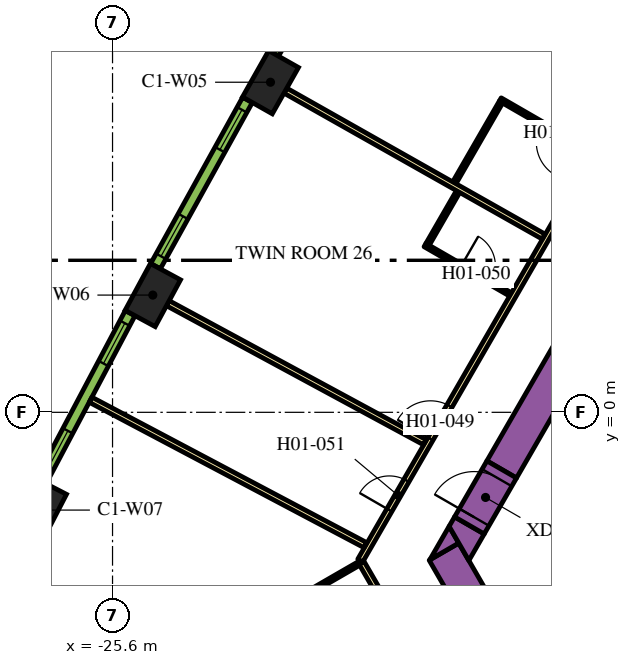
"""IFC4 building model, lengths in metres.
Left out: names, types, materials, properties, quantities, classifications, styles, units other than length and angle.
Written with IfcOpenShell. Run it as: python <this file> out.ifc"""

import sys

from ifc_helpers import new_model, si_unit, direction, frame, frame_2d, origin, origin_2d, place, context, subcontext, project, spatial, polyline, rectangle, outline, extrude, element, fill, save


model = new_model("IFC4")
c1 = context("Model", 3, precision=1e-05, world=origin(), true_north=direction((0.0, 1.0)))
c2 = subcontext(c1, "Body", "Model", "MODEL_VIEW")
j1 = project(units=[si_unit("LENGTHUNIT", "METRE"), si_unit("PLANEANGLEUNIT", "RADIAN")], contexts=[c1])
p1 = place(None, origin())
s1 = spatial("IfcSite", under=j1, at=p1, CompositionType="ELEMENT")
p2 = place(p1, origin())
s2 = spatial("IfcBuilding", under=s1, at=p2, CompositionType="ELEMENT")
p3 = place(p2, frame((0.0, 0.0, 27.6)))
s3 = spatial("IfcBuildingStorey", under=s2, at=p3, CompositionType="ELEMENT", Elevation=27.6)
for number, where, z_axis, x_axis in (
    (1, (-21.443, 8.685, 0.0), (0.0, 0.0, 1.0), (-0.492, -0.871, 0.0)),
    (2, (-24.54, 3.085, 0.0), (0.0, 0.0, 1.0), (-0.476, -0.88, 0.0)),
    (3, (-27.533, -2.572, 0.0), (0.0, 0.0, 1.0), (-0.459, -0.888, 0.0)),
):
    element("IfcColumn", number, at=place(p3, frame(where, z_axis=z_axis, x_axis=x_axis)), inside=s3, PredefinedType="COLUMN", context=c2, shape_type="SweptSolid", body=[
        extrude(rectangle(XDim=1.4, YDim=0.9, at=origin_2d()), origin(), (0.0, 0.0, 1.0), 3.9),
    ])
p4 = place(p3, frame((-15.36, -1.503, 0.0), z_axis=(0.0, 0.0, 1.0), x_axis=(0.50000389221, 0.866023156604, 0.0)))
e4 = element("IfcWall", 4, at=p4, inside=s3, PredefinedType="SOLIDWALL", context=c2, shape_type="SweptSolid", body=[
    extrude(rectangle(XDim=21.0, YDim=0.9, at=frame_2d((10.5, 0.0))), origin(), (0.0, 0.0, 1.0), 3.9),
])
p5 = place(p3, frame((-12.134, -11.883, 0.0), z_axis=(0.0, 0.0, 1.0), x_axis=(-0.500005339912, 0.866022320763, 0.0)))
e5 = element("IfcWall", 5, at=p5, inside=s3, PredefinedType="SOLIDWALL", context=c2, shape_type="SweptSolid", body=[
    extrude(rectangle(XDim=9.488, YDim=0.9, at=frame_2d((4.744, 0.0))), origin(), (0.0, 0.0, 1.0), 3.9),
])
p6 = place(p3, origin())
e6 = element("IfcWall", 6, at=p6, inside=s3, PredefinedType="SOLIDWALL", context=c2, shape_type="SweptSolid", body=[
    extrude(outline(polyline([(-16.489, -3.44), (-17.251, -3.88), (-16.743, -3.0), (-16.489, -3.44)])), origin(), (0.0, 0.0, 1.0), 3.9),
])
e7 = element("IfcWall", 7, at=p6, inside=s3, PredefinedType="SOLIDWALL", context=c2, shape_type="SweptSolid", body=[
    extrude(outline(polyline([(-15.82, -3.201), (-16.223, -3.9), (-16.743, -3.0), (-16.599, -2.751), (-15.82, -3.201)])), origin(), (0.0, 0.0, 1.0), 3.9),
])
p7 = place(p3, frame((-14.44, -6.49, 0.0), z_axis=(0.0, 0.0, 1.0), x_axis=(0.866022966069, 0.500004222222, 0.0)))
e8 = element("IfcWall", 8, at=p7, inside=s3, PredefinedType="SOLIDWALL", context=c2, shape_type="SweptSolid", body=[
    extrude(rectangle(XDim=6.8, YDim=0.25, at=frame_2d((3.4, 0.0))), origin(), (0.0, 0.0, 1.0), 3.9),
])
p8 = place(p3, frame((-16.209, -2.976, 0.0), z_axis=(0.0, 0.0, 1.0), x_axis=(0.499954529098, 0.86605165483, 0.0)))
e9 = element("IfcWall", 9, at=p8, inside=s3, PredefinedType="SOLIDWALL", context=c2, shape_type="SweptSolid", body=[
    extrude(rectangle(XDim=1.7, YDim=0.9, at=frame_2d((0.85, 0.0))), origin(), (0.0, 0.0, 1.0), 3.9),
])
p9 = place(p8, frame((0.25, 0.0, 0.0)))
e10 = element("IfcOpeningElement", 10, at=p9, cuts=e9, PredefinedType="OPENING", context=c2, shape_type="SweptSolid", body=[
    extrude(rectangle(XDim=1.2, YDim=2.1, at=frame_2d((0.6, 1.05))), frame((0.0, 0.46, 0.0), z_axis=(0.0, -1.0, 0.0), x_axis=(1.0, 0.0, 0.0)), (0.0, 0.0, 1.0), 0.92),
])
p10 = place(p3, frame((-19.081, -3.9, 0.0), z_axis=(0.0, 0.0, 1.0), x_axis=(0.499998313975, 0.866026377209, 0.0)))
e11 = element("IfcWall", 11, at=p10, inside=s3, PredefinedType="PARTITIONING", context=c2, shape_type="SweptSolid", body=[
    extrude(rectangle(XDim=25.766, YDim=0.15, at=frame_2d((12.883, 0.0))), origin(), (0.0, 0.0, 1.0), 2.75),
])
p11 = place(p10, frame((24.586, 0.0, 0.0)))
e12 = element("IfcOpeningElement", 12, at=p11, cuts=e11, PredefinedType="OPENING", context=c2, shape_type="SweptSolid", body=[
    extrude(rectangle(XDim=1.0, YDim=2.1, at=frame_2d((0.5, 1.05))), frame((0.0, 0.085, 0.0), z_axis=(0.0, -1.0, 0.0), x_axis=(1.0, 0.0, 0.0)), (0.0, 0.0, 1.0), 0.17),
])
p12 = place(p10, frame((16.196, 0.0, 0.0)))
e13 = element("IfcOpeningElement", 13, at=p12, cuts=e11, PredefinedType="OPENING", context=c2, shape_type="SweptSolid", body=[
    extrude(rectangle(XDim=1.0, YDim=2.1, at=frame_2d((0.5, 1.05))), frame((0.0, 0.085, 0.0), z_axis=(0.0, -1.0, 0.0), x_axis=(1.0, 0.0, 0.0)), (0.0, 0.0, 1.0), 0.17),
])
p13 = place(p10, frame((14.789, 0.0, 0.0)))
e14 = element("IfcOpeningElement", 14, at=p13, cuts=e11, PredefinedType="OPENING", context=c2, shape_type="SweptSolid", body=[
    extrude(rectangle(XDim=1.1, YDim=2.1, at=frame_2d((0.55, 1.05))), frame((0.0, 0.085, 0.0), z_axis=(0.0, -1.0, 0.0), x_axis=(1.0, 0.0, 0.0)), (0.0, 0.0, 1.0), 0.17),
])
p14 = place(p10, frame((3.698, 0.0, 0.0)))
e15 = element("IfcOpeningElement", 15, at=p14, cuts=e11, PredefinedType="OPENING", context=c2, shape_type="SweptSolid", body=[
    extrude(rectangle(XDim=1.0, YDim=2.1, at=frame_2d((0.5, 1.05))), frame((0.0, 0.085, 0.0), z_axis=(0.0, -1.0, 0.0), x_axis=(1.0, 0.0, 0.0)), (0.0, 0.0, 1.0), 0.17),
])
p15 = place(p10, frame((1.531, 0.0, 0.0)))
e16 = element("IfcOpeningElement", 16, at=p15, cuts=e11, PredefinedType="OPENING", context=c2, shape_type="SweptSolid", body=[
    extrude(rectangle(XDim=0.9, YDim=2.1, at=frame_2d((0.45, 1.05))), frame((0.0, 0.085, 0.0), z_axis=(0.0, -1.0, 0.0), x_axis=(1.0, 0.0, 0.0)), (0.0, 0.0, 1.0), 0.17),
])
p16 = place(p3, frame((-16.412, -8.523, 0.0), z_axis=(0.0, 0.0, 1.0), x_axis=(-0.500001929737, 0.866024289647, 0.0)))
e17 = element("IfcWall", 17, at=p16, inside=s3, PredefinedType="PARTITIONING", context=c2, shape_type="SweptSolid", body=[
    extrude(rectangle(XDim=5.268, YDim=0.15, at=frame_2d((2.634, 0.0))), origin(), (0.0, 0.0, 1.0), 2.75),
])
p17 = place(p16, frame((0.226, 0.0, 0.0)))
e18 = element("IfcOpeningElement", 18, at=p17, cuts=e17, PredefinedType="OPENING", context=c2, shape_type="SweptSolid", body=[
    extrude(rectangle(XDim=1.0, YDim=2.1, at=frame_2d((0.5, 1.05))), frame((0.0, 0.085, 0.0), z_axis=(0.0, -1.0, 0.0), x_axis=(1.0, 0.0, 0.0)), (0.0, 0.0, 1.0), 0.17),
])
p18 = place(p3, frame((-26.178, 0.331, 0.0), z_axis=(0.0, 0.0, 1.0), x_axis=(0.883908370409, -0.467660125221, 0.0)))
e19 = element("IfcWall", 19, at=p18, inside=s3, PredefinedType="PARTITIONING", context=c2, shape_type="SweptSolid", body=[
    extrude(rectangle(XDim=8.182, YDim=0.15, at=frame_2d((4.091, 0.0))), origin(), (0.0, 0.0, 1.0), 2.75),
])
p19 = place(p3, frame((-24.145, 2.871, 0.0), z_axis=(0.0, 0.0, 1.0), x_axis=(0.879551725039, -0.475803281809, 0.0)))
e20 = element("IfcWall", 20, at=p19, inside=s3, PredefinedType="PARTITIONING", context=c2, shape_type="SweptSolid", body=[
    extrude(rectangle(XDim=7.688, YDim=0.15, at=frame_2d((3.844, 0.0))), origin(), (0.0, 0.0, 1.0), 2.75),
])
p20 = place(p3, frame((-21.052, 8.464, 0.0), z_axis=(0.0, 0.0, 1.0), x_axis=(0.87059371954, -0.492002617368, 0.0)))
e21 = element("IfcWall", 21, at=p20, inside=s3, PredefinedType="PARTITIONING", context=c2, shape_type="SweptSolid", body=[
    extrude(rectangle(XDim=7.803, YDim=0.15, at=frame_2d((3.902, 0.0))), origin(), (0.0, 0.0, 1.0), 2.75),
])
p21 = place(p3, frame((-12.972, 6.831, 0.0), z_axis=(0.0, 0.0, 1.0), x_axis=(-0.866018616679, 0.500011755427, 0.0)))
e22 = element("IfcWall", 22, at=p21, inside=s3, PredefinedType="PARTITIONING", context=c2, shape_type="SweptSolid", body=[
    extrude(rectangle(XDim=2.8, YDim=0.1, at=frame_2d((1.4, 0.0))), origin(), (0.0, 0.0, 1.0), 2.75),
])
p22 = place(p21, frame((0.55, 0.0, 0.0)))
e23 = element("IfcOpeningElement", 23, at=p22, cuts=e22, PredefinedType="OPENING", context=c2, shape_type="SweptSolid", body=[
    extrude(rectangle(XDim=1.0, YDim=2.1, at=frame_2d((0.5, 1.05))), frame((0.0, 0.06, 0.0), z_axis=(0.0, -1.0, 0.0), x_axis=(1.0, 0.0, 0.0)), (0.0, 0.0, 1.0), 0.12),
])
p23 = place(p3, frame((-15.379, 8.163, 0.0), z_axis=(0.0, 0.0, 1.0), x_axis=(-0.499987006516, -0.866032905446, 0.0)))
e24 = element("IfcWall", 24, at=p23, inside=s3, PredefinedType="PARTITIONING", context=c2, shape_type="SweptSolid", body=[
    extrude(rectangle(XDim=2.45, YDim=0.1, at=frame_2d((1.225, 0.0))), origin(), (0.0, 0.0, 1.0), 2.75),
])
p24 = place(p3, frame((-17.378, 4.401, 0.0), z_axis=(0.0, 0.0, 1.0), x_axis=(0.865997922154, -0.500047596559, 0.0)))
e25 = element("IfcWall", 25, at=p24, inside=s3, PredefinedType="PARTITIONING", context=c2, shape_type="SweptSolid", body=[
    extrude(rectangle(XDim=2.6, YDim=0.1, at=frame_2d((1.3, 0.0))), origin(), (0.0, 0.0, 1.0), 2.75),
])
p25 = place(p24, frame((1.1, 0.0, 0.0)))
e26 = element("IfcOpeningElement", 26, at=p25, cuts=e25, PredefinedType="OPENING", context=c2, shape_type="SweptSolid", body=[
    extrude(rectangle(XDim=0.9, YDim=2.1, at=frame_2d((0.45, 1.05))), frame((0.0, 0.06, 0.0), z_axis=(0.0, -1.0, 0.0), x_axis=(1.0, 0.0, 0.0)), (0.0, 0.0, 1.0), 0.12),
])
p26 = place(p3, frame((-17.309, 4.419, 0.0), z_axis=(0.0, 0.0, 1.0), x_axis=(0.499880961361, 0.866094119867, 0.0)))
e27 = element("IfcWall", 27, at=p26, inside=s3, PredefinedType="PARTITIONING", context=c2, shape_type="SweptSolid", body=[
    extrude(rectangle(XDim=1.6, YDim=0.1, at=frame_2d((0.8, 0.0))), origin(), (0.0, 0.0, 1.0), 2.75),
])
p27 = place(p3, frame((-19.121, -3.981, 0.0), z_axis=(0.0, 0.0, 1.0), x_axis=(-0.866021400173, -0.500006934395, 0.0)))
e28 = element("IfcWall", 28, at=p27, inside=s3, PredefinedType="PARTITIONING", context=c2, shape_type="SweptSolid", body=[
    extrude(rectangle(XDim=2.6, YDim=0.1, at=frame_2d((1.3, 0.0))), origin(), (0.0, 0.0, 1.0), 2.75),
])
p28 = place(p3, frame((-18.858, 13.773, 0.0), z_axis=(0.0, 0.0, 1.0), x_axis=(-0.50002123722, -0.866013142123, 0.0)))
e29 = element("IfcWall", 29, at=p28, inside=s3, PredefinedType="SOLIDWALL", context=c2, shape_type="SweptSolid", body=[
    extrude(rectangle(XDim=4.998, YDim=0.29, at=frame_2d((2.499, 0.0))), origin(), (0.0, 0.0, 1.0), 3.65),
])
p29 = place(p28, frame((0.297, 0.0, 0.9)))
e30 = element("IfcOpeningElement", 30, at=p29, cuts=e29, PredefinedType="OPENING", context=c2, shape_type="SweptSolid", body=[
    extrude(rectangle(XDim=1.2, YDim=2.15, at=frame_2d((0.6, 1.075))), frame((0.0, 0.155, 0.0), z_axis=(0.0, -1.0, 0.0), x_axis=(1.0, 0.0, 0.0)), (0.0, 0.0, 1.0), 0.31),
])
p30 = place(p28, frame((3.501, 0.0, 0.9)))
e31 = element("IfcOpeningElement", 31, at=p30, cuts=e29, PredefinedType="OPENING", context=c2, shape_type="SweptSolid", body=[
    extrude(rectangle(XDim=1.2, YDim=2.15, at=frame_2d((0.6, 1.075))), frame((0.0, 0.155, 0.0), z_axis=(0.0, -1.0, 0.0), x_axis=(1.0, 0.0, 0.0)), (0.0, 0.0, 1.0), 0.31),
])
p31 = place(p3, frame((-22.05, 8.22, 0.0), z_axis=(0.0, 0.0, 1.0), x_axis=(-0.483912572871, -0.875116347589, 0.0)))
e32 = element("IfcWall", 32, at=p31, inside=s3, PredefinedType="SOLIDWALL", context=c2, shape_type="SweptSolid", body=[
    extrude(rectangle(XDim=4.998, YDim=0.29, at=frame_2d((2.499, 0.0))), origin(), (0.0, 0.0, 1.0), 3.65),
])
p32 = place(p31, frame((0.297, 0.0, 0.9)))
e33 = element("IfcOpeningElement", 33, at=p32, cuts=e32, PredefinedType="OPENING", context=c2, shape_type="SweptSolid", body=[
    extrude(rectangle(XDim=1.2, YDim=2.15, at=frame_2d((0.6, 1.075))), frame((0.0, 0.155, 0.0), z_axis=(0.0, -1.0, 0.0), x_axis=(1.0, 0.0, 0.0)), (0.0, 0.0, 1.0), 0.31),
])
p33 = place(p31, frame((3.501, 0.0, 0.9)))
e34 = element("IfcOpeningElement", 34, at=p33, cuts=e32, PredefinedType="OPENING", context=c2, shape_type="SweptSolid", body=[
    extrude(rectangle(XDim=1.2, YDim=2.15, at=frame_2d((0.6, 1.075))), frame((0.0, 0.155, 0.0), z_axis=(0.0, -1.0, 0.0), x_axis=(1.0, 0.0, 0.0)), (0.0, 0.0, 1.0), 0.31),
])
p34 = place(p3, frame((-25.138, 2.608, 0.0), z_axis=(0.0, 0.0, 1.0), x_axis=(-0.467629620899, -0.883924509026, 0.0)))
e35 = element("IfcWall", 35, at=p34, inside=s3, PredefinedType="SOLIDWALL", context=c2, shape_type="SweptSolid", body=[
    extrude(rectangle(XDim=4.998, YDim=0.29, at=frame_2d((2.499, 0.0))), origin(), (0.0, 0.0, 1.0), 3.65),
])
p35 = place(p34, frame((0.297, 0.0, 0.9)))
e36 = element("IfcOpeningElement", 36, at=p35, cuts=e35, PredefinedType="OPENING", context=c2, shape_type="SweptSolid", body=[
    extrude(rectangle(XDim=1.2, YDim=2.15, at=frame_2d((0.6, 1.075))), frame((0.0, 0.155, 0.0), z_axis=(0.0, -1.0, 0.0), x_axis=(1.0, 0.0, 0.0)), (0.0, 0.0, 1.0), 0.31),
])
p36 = place(p34, frame((3.501, 0.0, 0.9)))
e37 = element("IfcOpeningElement", 37, at=p36, cuts=e35, PredefinedType="OPENING", context=c2, shape_type="SweptSolid", body=[
    extrude(rectangle(XDim=1.2, YDim=2.15, at=frame_2d((0.6, 1.075))), frame((0.0, 0.155, 0.0), z_axis=(0.0, -1.0, 0.0), x_axis=(1.0, 0.0, 0.0)), (0.0, 0.0, 1.0), 0.31),
])
p37 = place(p9, origin())
e38 = element("IfcDoor", 38, at=p37, inside=s3, OperationType="SINGLE_SWING_LEFT", PredefinedType="DOOR", context=c2, shape_type="SweptSolid", body=[
    extrude(rectangle(XDim=1.2, YDim=2.1, at=frame_2d((0.6, 1.05))), frame((0.0, 0.025, 0.0), z_axis=(0.0, -1.0, 0.0), x_axis=(1.0, 0.0, 0.0)), (0.0, 0.0, 1.0), 0.05),
])
fill(e10, e38)
p38 = place(p22, origin())
e39 = element("IfcDoor", 39, at=p38, inside=s3, OperationType="SINGLE_SWING_LEFT", PredefinedType="DOOR", context=c2, shape_type="SweptSolid", body=[
    extrude(rectangle(XDim=1.0, YDim=2.1, at=frame_2d((0.5, 1.05))), frame((0.0, 0.025, 0.0), z_axis=(0.0, -1.0, 0.0), x_axis=(1.0, 0.0, 0.0)), (0.0, 0.0, 1.0), 0.05),
])
fill(e23, e39)
p39 = place(p14, origin())
e40 = element("IfcDoor", 40, at=p39, inside=s3, OperationType="SINGLE_SWING_LEFT", PredefinedType="DOOR", context=c2, shape_type="SweptSolid", body=[
    extrude(rectangle(XDim=1.0, YDim=2.1, at=frame_2d((0.5, 1.05))), frame((0.0, 0.025, 0.0), z_axis=(0.0, -1.0, 0.0), x_axis=(1.0, 0.0, 0.0)), (0.0, 0.0, 1.0), 0.05),
])
fill(e15, e40)
p40 = place(p25, origin())
e41 = element("IfcDoor", 41, at=p40, inside=s3, OperationType="SINGLE_SWING_LEFT", PredefinedType="DOOR", context=c2, shape_type="SweptSolid", body=[
    extrude(rectangle(XDim=0.9, YDim=2.1, at=frame_2d((0.45, 1.05))), frame((0.0, 0.025, 0.0), z_axis=(0.0, -1.0, 0.0), x_axis=(1.0, 0.0, 0.0)), (0.0, 0.0, 1.0), 0.05),
])
fill(e26, e41)
p41 = place(p15, origin())
e42 = element("IfcDoor", 42, at=p41, inside=s3, OperationType="SINGLE_SWING_LEFT", PredefinedType="DOOR", context=c2, shape_type="SweptSolid", body=[
    extrude(rectangle(XDim=0.9, YDim=2.1, at=frame_2d((0.45, 1.05))), frame((0.0, 0.025, 0.0), z_axis=(0.0, -1.0, 0.0), x_axis=(1.0, 0.0, 0.0)), (0.0, 0.0, 1.0), 0.05),
])
fill(e16, e42)
p42 = place(p32, origin())
e43 = element("IfcWindow", 43, at=p42, inside=s3, PartitioningType="DOUBLE_PANEL_VERTICAL", PredefinedType="WINDOW", context=c2, shape_type="SweptSolid", body=[
    extrude(rectangle(XDim=1.2, YDim=2.15, at=frame_2d((0.6, 1.075))), frame((0.0, 0.015, 0.0), z_axis=(0.0, -1.0, 0.0), x_axis=(1.0, 0.0, 0.0)), (0.0, 0.0, 1.0), 0.06),
])
fill(e33, e43)
p43 = place(p33, origin())
e44 = element("IfcWindow", 44, at=p43, inside=s3, PartitioningType="DOUBLE_PANEL_VERTICAL", PredefinedType="WINDOW", context=c2, shape_type="SweptSolid", body=[
    extrude(rectangle(XDim=1.2, YDim=2.15, at=frame_2d((0.6, 1.075))), frame((0.0, 0.015, 0.0), z_axis=(0.0, -1.0, 0.0), x_axis=(1.0, 0.0, 0.0)), (0.0, 0.0, 1.0), 0.06),
])
fill(e34, e44)
p44 = place(p35, origin())
e45 = element("IfcWindow", 45, at=p44, inside=s3, PartitioningType="DOUBLE_PANEL_VERTICAL", PredefinedType="WINDOW", context=c2, shape_type="SweptSolid", body=[
    extrude(rectangle(XDim=1.2, YDim=2.15, at=frame_2d((0.6, 1.075))), frame((0.0, 0.015, 0.0), z_axis=(0.0, -1.0, 0.0), x_axis=(1.0, 0.0, 0.0)), (0.0, 0.0, 1.0), 0.06),
])
fill(e36, e45)
p45 = place(p36, origin())
e46 = element("IfcWindow", 46, at=p45, inside=s3, PartitioningType="DOUBLE_PANEL_VERTICAL", PredefinedType="WINDOW", context=c2, shape_type="SweptSolid", body=[
    extrude(rectangle(XDim=1.2, YDim=2.15, at=frame_2d((0.6, 1.075))), frame((0.0, 0.015, 0.0), z_axis=(0.0, -1.0, 0.0), x_axis=(1.0, 0.0, 0.0)), (0.0, 0.0, 1.0), 0.06),
])
fill(e37, e46)
save(model, sys.argv[1])
